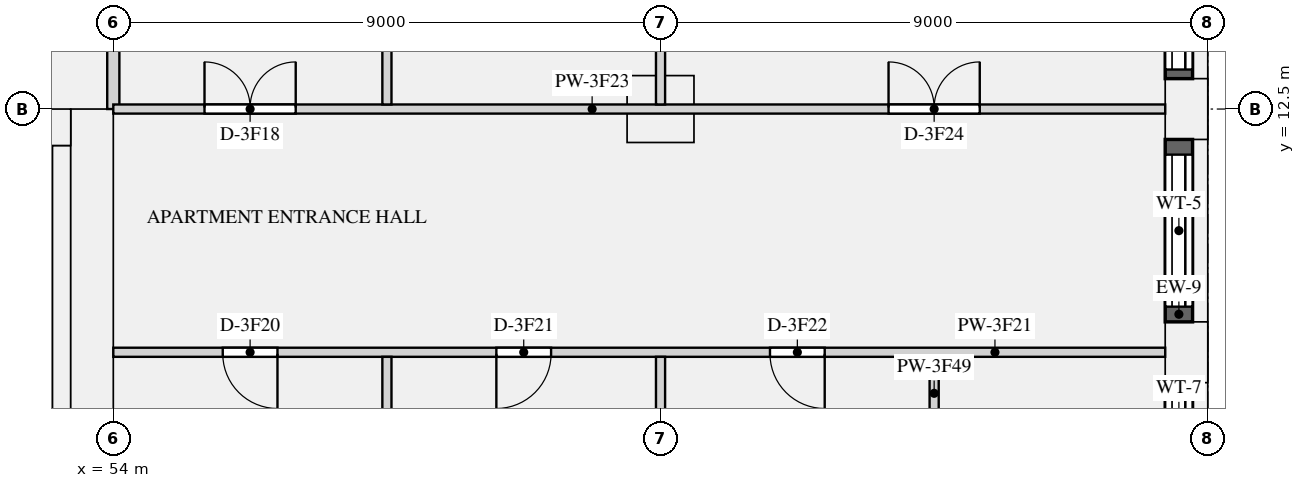
"""IFC4 building model, lengths in metres.
Left out: names, types, materials, properties, quantities, classifications, styles, units other than length and angle.
Written with IfcOpenShell. Run it as: python <this file> out.ifc"""

import sys

from ifc_helpers import new_model, si_unit, direction, frame, frame_2d, origin, origin_2d, place, context, subcontext, project, spatial, rectangle, extrude, element, fill, save


model = new_model("IFC4")
c1 = context("Model", 3, precision=1e-05, world=origin(), true_north=direction((0.0, 1.0)))
c2 = subcontext(c1, "Body", "Model", "MODEL_VIEW")
j1 = project(units=[si_unit("LENGTHUNIT", "METRE"), si_unit("PLANEANGLEUNIT", "RADIAN")], contexts=[c1])
p1 = place(None, origin())
s1 = spatial("IfcSite", under=j1, at=p1, CompositionType="ELEMENT")
p2 = place(p1, origin())
s2 = spatial("IfcBuilding", under=s1, at=p2, CompositionType="ELEMENT")
p3 = place(p2, frame((0.0, 0.0, 182.25)))
s3 = spatial("IfcBuildingStorey", under=s2, at=p3, CompositionType="ELEMENT", Elevation=182.25)
for number, where, z_axis, x_axis in (
    (1, (71.65, 8.5, 0.0), (0.0, 0.0, 1.0), (0.0, 1.0, 0.0)),
    (2, (71.65, 12.5, 0.0), (0.0, 0.0, 1.0), (0.0, 1.0, 0.0)),
):
    element("IfcColumn", number, at=place(p3, frame(where, z_axis=z_axis, x_axis=x_axis)), inside=s3, PredefinedType="USERDEFINED", context=c2, shape_type="SweptSolid", body=[
        extrude(rectangle(XDim=1.0, YDim=0.7, at=origin_2d()), origin(), (0.0, 0.0, 1.0), 3.15),
    ])
p4 = place(p3, frame((63.0, 12.5, 0.0), z_axis=(0.0, 0.0, 1.0), x_axis=(1.0, 0.0, 0.0)))
e3 = element("IfcColumn", 3, at=p4, inside=s3, PredefinedType="COLUMN", context=c2, shape_type="SweptSolid", body=[
    extrude(rectangle(XDim=1.1, YDim=1.1, at=origin_2d()), origin(), (0.0, 0.0, 1.0), 3.15),
])
p5 = place(p3, frame((53.65, 0.0, 0.0), z_axis=(0.0, 0.0, 1.0), x_axis=(0.0, 1.0, 0.0)))
e4 = element("IfcWall", 4, at=p5, inside=s3, PredefinedType="SHEAR", context=c2, shape_type="SweptSolid", body=[
    extrude(rectangle(XDim=12.5, YDim=0.7, at=frame_2d((6.25, 0.0))), origin(), (0.0, 0.0, 1.0), 3.15),
])
p6 = place(p3, frame((18.7, 12.2, 0.0), z_axis=(0.0, 0.0, 1.0), x_axis=(1.0, 0.0, 0.0)))
e5 = element("IfcWall", 5, at=p6, inside=s3, PredefinedType="SHEAR", context=c2, shape_type="SweptSolid", body=[
    extrude(rectangle(XDim=34.6, YDim=0.6, at=frame_2d((17.3, 0.0))), origin(), (0.0, 0.0, 1.0), 3.15),
])
p7 = place(p6, frame((24.475, 0.0, 0.0)))
e6 = element("IfcOpeningElement", 6, at=p7, cuts=e5, PredefinedType="OPENING", context=c2, shape_type="SweptSolid", body=[
    extrude(rectangle(XDim=1.1, YDim=2.1, at=frame_2d((0.55, 1.05))), frame((0.0, 0.31, 0.0), z_axis=(0.0, -1.0, 0.0), x_axis=(1.0, 0.0, 0.0)), (0.0, 0.0, 1.0), 0.62),
])
p8 = place(p6, frame((26.725, 0.0, 0.0)))
e7 = element("IfcOpeningElement", 7, at=p8, cuts=e5, PredefinedType="OPENING", context=c2, shape_type="SweptSolid", body=[
    extrude(rectangle(XDim=1.1, YDim=2.1, at=frame_2d((0.55, 1.05))), frame((0.0, 0.31, 0.0), z_axis=(0.0, -1.0, 0.0), x_axis=(1.0, 0.0, 0.0)), (0.0, 0.0, 1.0), 0.62),
])
p9 = place(p6, frame((28.975, 0.0, 0.0)))
e8 = element("IfcOpeningElement", 8, at=p9, cuts=e5, PredefinedType="OPENING", context=c2, shape_type="SweptSolid", body=[
    extrude(rectangle(XDim=1.1, YDim=2.1, at=frame_2d((0.55, 1.05))), frame((0.0, 0.31, 0.0), z_axis=(0.0, -1.0, 0.0), x_axis=(1.0, 0.0, 0.0)), (0.0, 0.0, 1.0), 0.62),
])
p10 = place(p6, frame((4.85, 0.0, 0.0)))
e9 = element("IfcOpeningElement", 9, at=p10, cuts=e5, PredefinedType="OPENING", context=c2, shape_type="SweptSolid", body=[
    extrude(rectangle(XDim=0.9, YDim=2.1, at=frame_2d((0.45, 1.05))), frame((0.0, 0.31, 0.0), z_axis=(0.0, -1.0, 0.0), x_axis=(1.0, 0.0, 0.0)), (0.0, 0.0, 1.0), 0.62),
])
p11 = place(p6, frame((11.85, 0.0, 0.0)))
e10 = element("IfcOpeningElement", 10, at=p11, cuts=e5, PredefinedType="OPENING", context=c2, shape_type="SweptSolid", body=[
    extrude(rectangle(XDim=0.9, YDim=2.1, at=frame_2d((0.45, 1.05))), frame((0.0, 0.31, 0.0), z_axis=(0.0, -1.0, 0.0), x_axis=(1.0, 0.0, 0.0)), (0.0, 0.0, 1.0), 0.62),
])
p12 = place(p6, frame((18.35, 0.0, 0.0)))
e11 = element("IfcOpeningElement", 11, at=p12, cuts=e5, PredefinedType="OPENING", context=c2, shape_type="SweptSolid", body=[
    extrude(rectangle(XDim=0.9, YDim=2.1, at=frame_2d((0.45, 1.05))), frame((0.0, 0.31, 0.0), z_axis=(0.0, -1.0, 0.0), x_axis=(1.0, 0.0, 0.0)), (0.0, 0.0, 1.0), 0.62),
])
p13 = place(p6, frame((1.45, 0.0, 0.0)))
e12 = element("IfcOpeningElement", 12, at=p13, cuts=e5, PredefinedType="OPENING", context=c2, shape_type="SweptSolid", body=[
    extrude(rectangle(XDim=1.2, YDim=2.1, at=frame_2d((0.6, 1.05))), frame((0.0, 0.31, 0.0), z_axis=(0.0, -1.0, 0.0), x_axis=(1.0, 0.0, 0.0)), (0.0, 0.0, 1.0), 0.62),
])
p14 = place(p6, frame((31.95, 0.0, 0.0)))
e13 = element("IfcOpeningElement", 13, at=p14, cuts=e5, PredefinedType="OPENING", context=c2, shape_type="SweptSolid", body=[
    extrude(rectangle(XDim=1.2, YDim=2.1, at=frame_2d((0.6, 1.05))), frame((0.0, 0.31, 0.0), z_axis=(0.0, -1.0, 0.0), x_axis=(1.0, 0.0, 0.0)), (0.0, 0.0, 1.0), 0.62),
])
p15 = place(p3, frame((53.15, 1.0, 0.0), z_axis=(0.0, 0.0, 1.0), x_axis=(0.0, 1.0, 0.0)))
e14 = element("IfcWall", 14, at=p15, inside=s3, PredefinedType="SHEAR", context=c2, shape_type="SweptSolid", body=[
    extrude(rectangle(XDim=10.9, YDim=0.3, at=frame_2d((5.45, 0.0))), origin(), (0.0, 0.0, 1.0), 3.15),
])
p16 = place(p3, frame((71.525, 5.5, 0.9), z_axis=(0.0, 0.0, 1.0), x_axis=(0.0, 1.0, 0.0)))
e15 = element("IfcWall", 15, at=p16, inside=s3, PredefinedType="SOLIDWALL", context=c2, shape_type="SweptSolid", body=[
    extrude(rectangle(XDim=2.5, YDim=0.45, at=frame_2d((1.25, 0.0))), origin(), (0.0, 0.0, 1.0), 1.75),
])
p17 = place(p16, frame((0.25, 0.0, 0.15)))
e16 = element("IfcOpeningElement", 16, at=p17, cuts=e15, PredefinedType="OPENING", context=c2, shape_type="SweptSolid", body=[
    extrude(rectangle(XDim=2.0, YDim=1.5, at=frame_2d((1.0, 0.75))), frame((0.0, 0.235, 0.0), z_axis=(0.0, -1.0, 0.0), x_axis=(1.0, 0.0, 0.0)), (0.0, 0.0, 1.0), 0.47),
])
p18 = place(p3, frame((71.525, 9.0, 0.9), z_axis=(0.0, 0.0, 1.0), x_axis=(0.0, 1.0, 0.0)))
e17 = element("IfcWall", 17, at=p18, inside=s3, PredefinedType="SOLIDWALL", context=c2, shape_type="SweptSolid", body=[
    extrude(rectangle(XDim=3.0, YDim=0.45, at=frame_2d((1.5, 0.0))), origin(), (0.0, 0.0, 1.0), 1.75),
])
p19 = place(p18, frame((0.25, 0.0, 0.15)))
e18 = element("IfcOpeningElement", 18, at=p19, cuts=e17, PredefinedType="OPENING", context=c2, shape_type="SweptSolid", body=[
    extrude(rectangle(XDim=2.5, YDim=1.5, at=frame_2d((1.25, 0.75))), frame((0.0, 0.235, 0.0), z_axis=(0.0, -1.0, 0.0), x_axis=(1.0, 0.0, 0.0)), (0.0, 0.0, 1.0), 0.47),
])
p20 = place(p3, frame((71.525, 13.0, 0.9), z_axis=(0.0, 0.0, 1.0), x_axis=(0.0, 1.0, 0.0)))
e19 = element("IfcWall", 19, at=p20, inside=s3, PredefinedType="SOLIDWALL", context=c2, shape_type="SweptSolid", body=[
    extrude(rectangle(XDim=2.8, YDim=0.45, at=frame_2d((1.4, 0.0))), origin(), (0.0, 0.0, 1.0), 1.75),
])
p21 = place(p20, frame((0.15, 0.0, 0.15)))
e20 = element("IfcOpeningElement", 20, at=p21, cuts=e19, PredefinedType="OPENING", context=c2, shape_type="SweptSolid", body=[
    extrude(rectangle(XDim=2.5, YDim=1.5, at=frame_2d((1.25, 0.75))), frame((0.0, 0.235, 0.0), z_axis=(0.0, -1.0, 0.0), x_axis=(1.0, 0.0, 0.0)), (0.0, 0.0, 1.0), 0.47),
])
p22 = place(p3, frame((54.0, 12.5, 0.0), z_axis=(0.0, 0.0, 1.0), x_axis=(0.0, 1.0, 0.0)))
e21 = element("IfcWall", 21, at=p22, inside=s3, PredefinedType="PARTITIONING", context=c2, shape_type="SweptSolid", body=[
    extrude(rectangle(XDim=3.4, YDim=0.2, at=frame_2d((1.7, 0.0))), origin(), (0.0, 0.0, 1.0), 2.65),
])
p23 = place(p3, frame((54.0, 8.5, 0.0), z_axis=(0.0, 0.0, 1.0), x_axis=(1.0, 0.0, 0.0)))
e22 = element("IfcWall", 22, at=p23, inside=s3, PredefinedType="PARTITIONING", context=c2, shape_type="SweptSolid", body=[
    extrude(rectangle(XDim=17.3, YDim=0.15, at=frame_2d((8.65, 0.0))), origin(), (0.0, 0.0, 1.0), 2.65),
])
p24 = place(p23, frame((1.8, 0.0, 0.0)))
e23 = element("IfcOpeningElement", 23, at=p24, cuts=e22, PredefinedType="OPENING", context=c2, shape_type="SweptSolid", body=[
    extrude(rectangle(XDim=0.9, YDim=2.1, at=frame_2d((0.45, 1.05))), frame((0.0, 0.085, 0.0), z_axis=(0.0, -1.0, 0.0), x_axis=(1.0, 0.0, 0.0)), (0.0, 0.0, 1.0), 0.17),
])
p25 = place(p23, frame((6.3, 0.0, 0.0)))
e24 = element("IfcOpeningElement", 24, at=p25, cuts=e22, PredefinedType="OPENING", context=c2, shape_type="SweptSolid", body=[
    extrude(rectangle(XDim=0.9, YDim=2.1, at=frame_2d((0.45, 1.05))), frame((0.0, 0.085, 0.0), z_axis=(0.0, -1.0, 0.0), x_axis=(1.0, 0.0, 0.0)), (0.0, 0.0, 1.0), 0.17),
])
p26 = place(p23, frame((10.8, 0.0, 0.0)))
e25 = element("IfcOpeningElement", 25, at=p26, cuts=e22, PredefinedType="OPENING", context=c2, shape_type="SweptSolid", body=[
    extrude(rectangle(XDim=0.9, YDim=2.1, at=frame_2d((0.45, 1.05))), frame((0.0, 0.085, 0.0), z_axis=(0.0, -1.0, 0.0), x_axis=(1.0, 0.0, 0.0)), (0.0, 0.0, 1.0), 0.17),
])
p27 = place(p3, frame((54.0, 12.5, 0.0), z_axis=(0.0, 0.0, 1.0), x_axis=(1.0, 0.0, 0.0)))
e26 = element("IfcWall", 26, at=p27, inside=s3, PredefinedType="PARTITIONING", context=c2, shape_type="SweptSolid", body=[
    extrude(rectangle(XDim=17.3, YDim=0.15, at=frame_2d((8.65, 0.0))), origin(), (0.0, 0.0, 1.0), 2.65),
])
p28 = place(p27, frame((1.5, 0.0, 0.0)))
e27 = element("IfcOpeningElement", 27, at=p28, cuts=e26, PredefinedType="OPENING", context=c2, shape_type="SweptSolid", body=[
    extrude(rectangle(XDim=1.5, YDim=2.1, at=frame_2d((0.75, 1.05))), frame((0.0, 0.085, 0.0), z_axis=(0.0, -1.0, 0.0), x_axis=(1.0, 0.0, 0.0)), (0.0, 0.0, 1.0), 0.17),
])
p29 = place(p27, frame((12.75, 0.0, 0.0)))
e28 = element("IfcOpeningElement", 28, at=p29, cuts=e26, PredefinedType="OPENING", context=c2, shape_type="SweptSolid", body=[
    extrude(rectangle(XDim=1.5, YDim=2.1, at=frame_2d((0.75, 1.05))), frame((0.0, 0.085, 0.0), z_axis=(0.0, -1.0, 0.0), x_axis=(1.0, 0.0, 0.0)), (0.0, 0.0, 1.0), 0.17),
])
p30 = place(p3, frame((58.5, 0.7, 0.0), z_axis=(0.0, 0.0, 1.0), x_axis=(0.0, 1.0, 0.0)))
e29 = element("IfcWall", 29, at=p30, inside=s3, PredefinedType="PARTITIONING", context=c2, shape_type="SweptSolid", body=[
    extrude(rectangle(XDim=7.725, YDim=0.15, at=frame_2d((3.863, 0.0))), origin(), (0.0, 0.0, 1.0), 2.65),
])
p31 = place(p3, frame((58.5, 12.575, 0.0), z_axis=(0.0, 0.0, 1.0), x_axis=(0.0, 1.0, 0.0)))
e30 = element("IfcWall", 30, at=p31, inside=s3, PredefinedType="PARTITIONING", context=c2, shape_type="SweptSolid", body=[
    extrude(rectangle(XDim=10.325, YDim=0.15, at=frame_2d((5.163, 0.0))), origin(), (0.0, 0.0, 1.0), 2.65),
])
p32 = place(p31, frame((4.75, 0.0, 0.0)))
e31 = element("IfcOpeningElement", 31, at=p32, cuts=e30, PredefinedType="OPENING", context=c2, shape_type="SweptSolid", body=[
    extrude(rectangle(XDim=0.9, YDim=2.1, at=frame_2d((0.45, 1.05))), frame((0.0, 0.085, 0.0), z_axis=(0.0, -1.0, 0.0), x_axis=(1.0, 0.0, 0.0)), (0.0, 0.0, 1.0), 0.17),
])
p33 = place(p3, frame((63.0, 0.7, 0.0), z_axis=(0.0, 0.0, 1.0), x_axis=(0.0, 1.0, 0.0)))
e32 = element("IfcWall", 32, at=p33, inside=s3, PredefinedType="PARTITIONING", context=c2, shape_type="SweptSolid", body=[
    extrude(rectangle(XDim=7.725, YDim=0.15, at=frame_2d((3.863, 0.0))), origin(), (0.0, 0.0, 1.0), 2.65),
])
p34 = place(p3, frame((63.0, 12.575, 0.0), z_axis=(0.0, 0.0, 1.0), x_axis=(0.0, 1.0, 0.0)))
e33 = element("IfcWall", 33, at=p34, inside=s3, PredefinedType="PARTITIONING", context=c2, shape_type="SweptSolid", body=[
    extrude(rectangle(XDim=16.35, YDim=0.15, at=frame_2d((8.175, 0.0))), origin(), (0.0, 0.0, 1.0), 2.65),
])
p35 = place(p34, frame((3.75, 0.0, 0.0)))
e34 = element("IfcOpeningElement", 34, at=p35, cuts=e33, PredefinedType="OPENING", context=c2, shape_type="SweptSolid", body=[
    extrude(rectangle(XDim=0.9, YDim=2.1, at=frame_2d((0.45, 1.05))), frame((0.0, 0.085, 0.0), z_axis=(0.0, -1.0, 0.0), x_axis=(1.0, 0.0, 0.0)), (0.0, 0.0, 1.0), 0.17),
])
p36 = place(p34, frame((13.75, 0.0, 0.0)))
e35 = element("IfcOpeningElement", 35, at=p36, cuts=e33, PredefinedType="OPENING", context=c2, shape_type="SweptSolid", body=[
    extrude(rectangle(XDim=0.9, YDim=2.1, at=frame_2d((0.45, 1.05))), frame((0.0, 0.085, 0.0), z_axis=(0.0, -1.0, 0.0), x_axis=(1.0, 0.0, 0.0)), (0.0, 0.0, 1.0), 0.17),
])
p37 = place(p3, frame((67.5, 5.2, 0.0), z_axis=(0.0, 0.0, 1.0), x_axis=(0.0, 1.0, 0.0)))
e36 = element("IfcWall", 36, at=p37, inside=s3, PredefinedType="PARTITIONING", context=c2, shape_type="SweptSolid", body=[
    extrude(rectangle(XDim=3.225, YDim=0.15, at=frame_2d((1.613, 0.0))), origin(), (0.0, 0.0, 1.0), 2.65),
])
p38 = place(p37, frame((1.125, 0.0, 0.0)))
e37 = element("IfcOpeningElement", 37, at=p38, cuts=e36, PredefinedType="OPENING", context=c2, shape_type="SweptSolid", body=[
    extrude(rectangle(XDim=0.9, YDim=2.1, at=frame_2d((0.45, 1.05))), frame((0.0, 0.085, 0.0), z_axis=(0.0, -1.0, 0.0), x_axis=(1.0, 0.0, 0.0)), (0.0, 0.0, 1.0), 0.17),
])
p39 = place(p17, origin())
e38 = element("IfcWindow", 38, at=p39, inside=s3, PartitioningType="SINGLE_PANEL", PredefinedType="WINDOW", context=c2, shape_type="SweptSolid", body=[
    extrude(rectangle(XDim=2.0, YDim=1.5, at=frame_2d((1.0, 0.75))), frame((0.0, -0.065, 0.0), z_axis=(0.0, -1.0, 0.0), x_axis=(1.0, 0.0, 0.0)), (0.0, 0.0, 1.0), 0.06),
])
fill(e16, e38)
p40 = place(p19, origin())
e39 = element("IfcWindow", 39, at=p40, inside=s3, PartitioningType="SINGLE_PANEL", PredefinedType="WINDOW", context=c2, shape_type="SweptSolid", body=[
    extrude(rectangle(XDim=2.5, YDim=1.5, at=frame_2d((1.25, 0.75))), frame((0.0, -0.065, 0.0), z_axis=(0.0, -1.0, 0.0), x_axis=(1.0, 0.0, 0.0)), (0.0, 0.0, 1.0), 0.06),
])
fill(e18, e39)
p41 = place(p21, origin())
e40 = element("IfcWindow", 40, at=p41, inside=s3, PartitioningType="SINGLE_PANEL", PredefinedType="WINDOW", context=c2, shape_type="SweptSolid", body=[
    extrude(rectangle(XDim=2.5, YDim=1.5, at=frame_2d((1.25, 0.75))), frame((0.0, -0.065, 0.0), z_axis=(0.0, -1.0, 0.0), x_axis=(1.0, 0.0, 0.0)), (0.0, 0.0, 1.0), 0.06),
])
fill(e20, e40)
p42 = place(p28, origin())
e41 = element("IfcDoor", 41, at=p42, inside=s3, OperationType="DOUBLE_DOOR_SINGLE_SWING", PredefinedType="DOOR", context=c2, shape_type="SweptSolid", body=[
    extrude(rectangle(XDim=1.5, YDim=2.1, at=frame_2d((0.75, 1.05))), frame((0.0, 0.025, 0.0), z_axis=(0.0, -1.0, 0.0), x_axis=(1.0, 0.0, 0.0)), (0.0, 0.0, 1.0), 0.05),
])
fill(e27, e41)
p43 = place(p24, frame((0.9, 0.0, 0.0), z_axis=(0.0, 0.0, 1.0), x_axis=(-1.0, 0.0, 0.0)))
e42 = element("IfcDoor", 42, at=p43, inside=s3, OperationType="SINGLE_SWING_LEFT", PredefinedType="DOOR", context=c2, shape_type="SweptSolid", body=[
    extrude(rectangle(XDim=0.9, YDim=2.1, at=frame_2d((0.45, 1.05))), frame((0.0, 0.025, 0.0), z_axis=(0.0, -1.0, 0.0), x_axis=(1.0, 0.0, 0.0)), (0.0, 0.0, 1.0), 0.05),
])
fill(e23, e42)
p44 = place(p25, frame((0.9, 0.0, 0.0), z_axis=(0.0, 0.0, 1.0), x_axis=(-1.0, 0.0, 0.0)))
e43 = element("IfcDoor", 43, at=p44, inside=s3, OperationType="SINGLE_SWING_RIGHT", PredefinedType="DOOR", context=c2, shape_type="SweptSolid", body=[
    extrude(rectangle(XDim=0.9, YDim=2.1, at=frame_2d((0.45, 1.05))), frame((0.0, 0.025, 0.0), z_axis=(0.0, -1.0, 0.0), x_axis=(1.0, 0.0, 0.0)), (0.0, 0.0, 1.0), 0.05),
])
fill(e24, e43)
p45 = place(p26, frame((0.9, 0.0, 0.0), z_axis=(0.0, 0.0, 1.0), x_axis=(-1.0, 0.0, 0.0)))
e44 = element("IfcDoor", 44, at=p45, inside=s3, OperationType="SINGLE_SWING_LEFT", PredefinedType="DOOR", context=c2, shape_type="SweptSolid", body=[
    extrude(rectangle(XDim=0.9, YDim=2.1, at=frame_2d((0.45, 1.05))), frame((0.0, 0.025, 0.0), z_axis=(0.0, -1.0, 0.0), x_axis=(1.0, 0.0, 0.0)), (0.0, 0.0, 1.0), 0.05),
])
fill(e25, e44)
p46 = place(p29, origin())
e45 = element("IfcDoor", 45, at=p46, inside=s3, OperationType="DOUBLE_DOOR_SINGLE_SWING", PredefinedType="DOOR", context=c2, shape_type="SweptSolid", body=[
    extrude(rectangle(XDim=1.5, YDim=2.1, at=frame_2d((0.75, 1.05))), frame((0.0, 0.025, 0.0), z_axis=(0.0, -1.0, 0.0), x_axis=(1.0, 0.0, 0.0)), (0.0, 0.0, 1.0), 0.05),
])
fill(e28, e45)
save(model, sys.argv[1])
